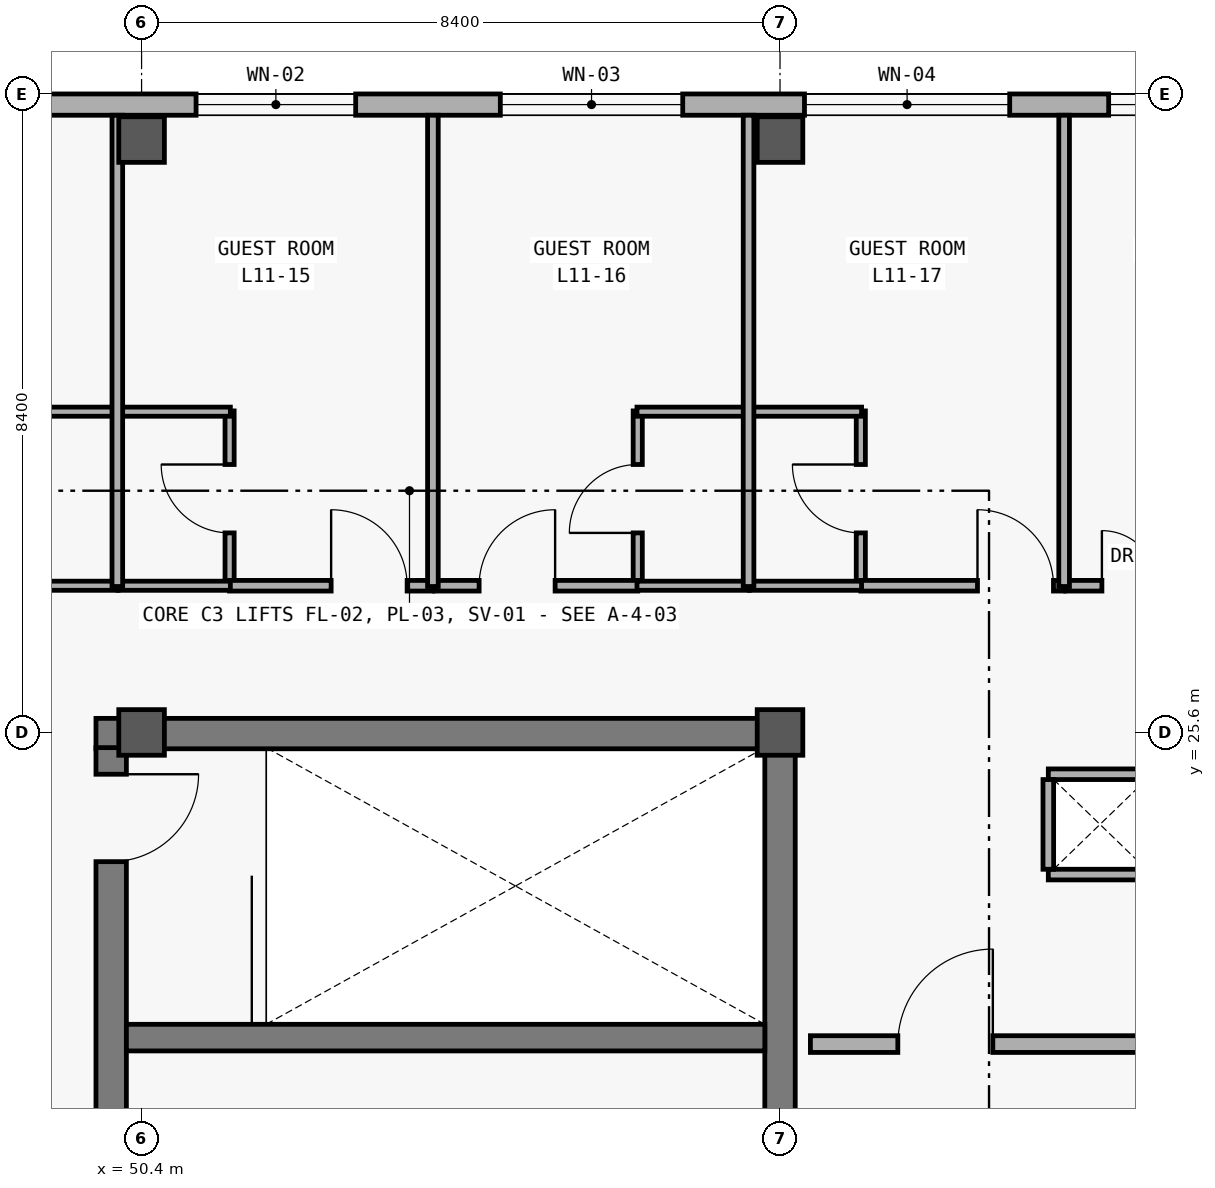
"""IFC4 building model, lengths in metres.
Left out: names, types, materials, properties, quantities, classifications, styles, units other than length and angle.
Written with IfcOpenShell. Run it as: python <this file> out.ifc"""

import sys

from ifc_helpers import new_model, si_unit, direction, frame, frame_2d, origin, origin_2d, place, context, subcontext, project, spatial, rectangle, extrude, element, fill, save


model = new_model("IFC4")
c1 = context("Model", 3, precision=1e-05, world=origin(), true_north=direction((0.0, 1.0)))
c2 = subcontext(c1, "Body", "Model", "MODEL_VIEW")
j1 = project(units=[si_unit("LENGTHUNIT", "METRE"), si_unit("PLANEANGLEUNIT", "RADIAN")], contexts=[c1])
p1 = place(None, origin())
s1 = spatial("IfcSite", under=j1, at=p1, CompositionType="ELEMENT")
p2 = place(p1, origin())
s2 = spatial("IfcBuilding", under=s1, at=p2, CompositionType="ELEMENT")
p3 = place(p2, frame((0.0, 0.0, 44.4)))
s3 = spatial("IfcBuildingStorey", under=s2, at=p3, CompositionType="ELEMENT", Elevation=44.4)
for number, where, z_axis, x_axis in (
    (1, (50.4, 25.6, 0.0), (0.0, 0.0, 1.0), (1.0, 0.0, 0.0)),
    (2, (50.4, 33.4, 0.0), (0.0, 0.0, 1.0), (1.0, 0.0, 0.0)),
    (3, (58.8, 25.6, 0.0), (0.0, 0.0, 1.0), (1.0, 0.0, 0.0)),
    (4, (58.8, 33.4, 0.0), (0.0, 0.0, 1.0), (1.0, 0.0, 0.0)),
):
    element("IfcColumn", number, at=place(p3, frame(where, z_axis=z_axis, x_axis=x_axis)), inside=s3, PredefinedType="COLUMN", context=c2, shape_type="SweptSolid", body=[
        extrude(rectangle(XDim=0.6, YDim=0.6, at=origin_2d()), origin(), (0.0, 0.0, 1.0), 4.2),
    ])
p4 = place(p3, frame((17.08, 33.86, 0.0), z_axis=(0.0, 0.0, 1.0), x_axis=(1.0, 0.0, 0.0)))
e5 = element("IfcWall", 5, at=p4, inside=s3, PredefinedType="SOLIDWALL", context=c2, shape_type="SweptSolid", body=[
    extrude(rectangle(XDim=49.84, YDim=0.28, at=frame_2d((24.92, 0.0))), origin(), (0.0, 0.0, 1.0), 3.96),
])
p5 = place(p4, frame((5.295, 0.0, 0.85)))
e6 = element("IfcOpeningElement", 6, at=p5, cuts=e5, PredefinedType="OPENING", context=c2, shape_type="SweptSolid", body=[
    extrude(rectangle(XDim=1.8, YDim=1.6, at=frame_2d((0.9, 0.8))), frame((0.0, 0.15, 0.0), z_axis=(0.0, -1.0, 0.0), x_axis=(1.0, 0.0, 0.0)), (0.0, 0.0, 1.0), 0.3),
])
p6 = place(p4, frame((13.136, 0.0, 0.85)))
e7 = element("IfcOpeningElement", 7, at=p6, cuts=e5, PredefinedType="OPENING", context=c2, shape_type="SweptSolid", body=[
    extrude(rectangle(XDim=2.38, YDim=1.95, at=frame_2d((1.19, 0.975))), frame((0.0, 0.15, 0.0), z_axis=(0.0, -1.0, 0.0), x_axis=(1.0, 0.0, 0.0)), (0.0, 0.0, 1.0), 0.3),
])
p7 = place(p4, frame((17.238, 0.0, 0.85)))
e8 = element("IfcOpeningElement", 8, at=p7, cuts=e5, PredefinedType="OPENING", context=c2, shape_type="SweptSolid", body=[
    extrude(rectangle(XDim=2.48, YDim=2.0, at=frame_2d((1.24, 1.0))), frame((0.0, 0.15, 0.0), z_axis=(0.0, -1.0, 0.0), x_axis=(1.0, 0.0, 0.0)), (0.0, 0.0, 1.0), 0.3),
])
p8 = place(p4, frame((21.305, 0.0, 0.85)))
e9 = element("IfcOpeningElement", 9, at=p8, cuts=e5, PredefinedType="OPENING", context=c2, shape_type="SweptSolid", body=[
    extrude(rectangle(XDim=2.65, YDim=2.0, at=frame_2d((1.325, 1.0))), frame((0.0, 0.15, 0.0), z_axis=(0.0, -1.0, 0.0), x_axis=(1.0, 0.0, 0.0)), (0.0, 0.0, 1.0), 0.3),
])
p9 = place(p4, frame((25.308, 0.0, 0.85)))
e10 = element("IfcOpeningElement", 10, at=p9, cuts=e5, PredefinedType="OPENING", context=c2, shape_type="SweptSolid", body=[
    extrude(rectangle(XDim=2.95, YDim=2.05, at=frame_2d((1.475, 1.025))), frame((0.0, 0.15, 0.0), z_axis=(0.0, -1.0, 0.0), x_axis=(1.0, 0.0, 0.0)), (0.0, 0.0, 1.0), 0.3),
])
p10 = place(p4, frame((30.035, 0.0, 0.85)))
e11 = element("IfcOpeningElement", 11, at=p10, cuts=e5, PredefinedType="OPENING", context=c2, shape_type="SweptSolid", body=[
    extrude(rectangle(XDim=1.8, YDim=1.8, at=frame_2d((0.9, 0.9))), frame((0.0, 0.15, 0.0), z_axis=(0.0, -1.0, 0.0), x_axis=(1.0, 0.0, 0.0)), (0.0, 0.0, 1.0), 0.3),
])
p11 = place(p4, frame((34.037, 0.0, 0.85)))
e12 = element("IfcOpeningElement", 12, at=p11, cuts=e5, PredefinedType="OPENING", context=c2, shape_type="SweptSolid", body=[
    extrude(rectangle(XDim=2.1, YDim=1.8, at=frame_2d((1.05, 0.9))), frame((0.0, 0.15, 0.0), z_axis=(0.0, -1.0, 0.0), x_axis=(1.0, 0.0, 0.0)), (0.0, 0.0, 1.0), 0.3),
])
p12 = place(p4, frame((38.04, 0.0, 0.85)))
e13 = element("IfcOpeningElement", 13, at=p12, cuts=e5, PredefinedType="OPENING", context=c2, shape_type="SweptSolid", body=[
    extrude(rectangle(XDim=2.4, YDim=1.8, at=frame_2d((1.2, 0.9))), frame((0.0, 0.15, 0.0), z_axis=(0.0, -1.0, 0.0), x_axis=(1.0, 0.0, 0.0)), (0.0, 0.0, 1.0), 0.3),
])
p13 = place(p4, frame((42.042, 0.0, 0.85)))
e14 = element("IfcOpeningElement", 14, at=p13, cuts=e5, PredefinedType="OPENING", context=c2, shape_type="SweptSolid", body=[
    extrude(rectangle(XDim=2.7, YDim=1.85, at=frame_2d((1.35, 0.925))), frame((0.0, 0.15, 0.0), z_axis=(0.0, -1.0, 0.0), x_axis=(1.0, 0.0, 0.0)), (0.0, 0.0, 1.0), 0.3),
])
p14 = place(p4, frame((46.044, 0.0, 0.85)))
e15 = element("IfcOpeningElement", 15, at=p14, cuts=e5, PredefinedType="OPENING", context=c2, shape_type="SweptSolid", body=[
    extrude(rectangle(XDim=3.0, YDim=1.9, at=frame_2d((1.5, 0.95))), frame((0.0, 0.15, 0.0), z_axis=(0.0, -1.0, 0.0), x_axis=(1.0, 0.0, 0.0)), (0.0, 0.0, 1.0), 0.3),
])
p15 = place(p3, frame((59.0, 25.585, 0.0), z_axis=(0.0, 0.0, 1.0), x_axis=(-1.0, 0.0, 0.0)))
e16 = element("IfcWall", 16, at=p15, inside=s3, PredefinedType="SHEAR", context=c2, shape_type="SweptSolid", body=[
    extrude(rectangle(XDim=9.2, YDim=0.4, at=frame_2d((4.6, 0.0))), origin(), (0.0, 0.0, 1.0), 3.96),
])
p16 = place(p3, frame((50.0, 25.4, 0.0), z_axis=(0.0, 0.0, 1.0), x_axis=(0.0, -1.0, 0.0)))
e17 = element("IfcWall", 17, at=p16, inside=s3, PredefinedType="SHEAR", context=c2, shape_type="SweptSolid", body=[
    extrude(rectangle(XDim=7.4, YDim=0.4, at=frame_2d((3.7, 0.0))), origin(), (0.0, 0.0, 1.0), 3.96),
])
p17 = place(p16, frame((0.35, 0.0, 0.0)))
e18 = element("IfcOpeningElement", 18, at=p17, cuts=e17, PredefinedType="OPENING", context=c2, shape_type="SweptSolid", body=[
    extrude(rectangle(XDim=1.15, YDim=2.2, at=frame_2d((0.575, 1.1))), frame((0.0, 0.21, 0.0), z_axis=(0.0, -1.0, 0.0), x_axis=(1.0, 0.0, 0.0)), (0.0, 0.0, 1.0), 0.42),
])
p18 = place(p3, frame((58.8, 18.0, 0.0), z_axis=(0.0, 0.0, 1.0), x_axis=(0.0, 1.0, 0.0)))
e19 = element("IfcWall", 19, at=p18, inside=s3, PredefinedType="SHEAR", context=c2, shape_type="SweptSolid", body=[
    extrude(rectangle(XDim=7.4, YDim=0.4, at=frame_2d((3.7, 0.0))), origin(), (0.0, 0.0, 1.0), 3.96),
])
p19 = place(p3, frame((50.2, 21.585, 0.0), z_axis=(0.0, 0.0, 1.0), x_axis=(1.0, 0.0, 0.0)))
e20 = element("IfcWall", 20, at=p19, inside=s3, PredefinedType="SHEAR", context=c2, shape_type="SweptSolid", body=[
    extrude(rectangle(XDim=8.4, YDim=0.35, at=frame_2d((4.2, 0.0))), origin(), (0.0, 0.0, 1.0), 3.96),
])
p20 = place(p3, frame((59.2, 21.5, 0.0), z_axis=(0.0, 0.0, 1.0), x_axis=(1.0, 0.0, 0.0)))
e21 = element("IfcWall", 21, at=p20, inside=s3, PredefinedType="SOLIDWALL", context=c2, shape_type="SweptSolid", body=[
    extrude(rectangle(XDim=4.8, YDim=0.22, at=frame_2d((2.4, 0.0))), origin(), (0.0, 0.0, 1.0), 3.11),
])
p21 = place(p20, frame((1.15, 0.0, 0.0)))
e22 = element("IfcOpeningElement", 22, at=p21, cuts=e21, PredefinedType="OPENING", context=c2, shape_type="SweptSolid", body=[
    extrude(rectangle(XDim=1.25, YDim=2.2, at=frame_2d((0.625, 1.1))), frame((0.0, 0.12, 0.0), z_axis=(0.0, -1.0, 0.0), x_axis=(1.0, 0.0, 0.0)), (0.0, 0.0, 1.0), 0.24),
])
p22 = place(p3, frame((51.558, 27.52, 0.0), z_axis=(0.0, 0.0, 1.0), x_axis=(0.0, 1.0, 0.0)))
e23 = element("IfcWall", 23, at=p22, inside=s3, PredefinedType="PARTITIONING", context=c2, shape_type="SweptSolid", body=[
    extrude(rectangle(XDim=2.31, YDim=0.12, at=frame_2d((1.155, 0.0))), origin(), (0.0, 0.0, 1.0), 3.06),
])
p23 = place(p22, frame((0.705, 0.0, 0.0)))
e24 = element("IfcOpeningElement", 24, at=p23, cuts=e23, PredefinedType="OPENING", context=c2, shape_type="SweptSolid", body=[
    extrude(rectangle(XDim=0.9, YDim=2.18, at=frame_2d((0.45, 1.09))), frame((0.0, 0.07, 0.0), z_axis=(0.0, -1.0, 0.0), x_axis=(1.0, 0.0, 0.0)), (0.0, 0.0, 1.0), 0.14),
])
p24 = place(p3, frame((56.928, 27.52, 0.0), z_axis=(0.0, 0.0, 1.0), x_axis=(0.0, 1.0, 0.0)))
e25 = element("IfcWall", 25, at=p24, inside=s3, PredefinedType="PARTITIONING", context=c2, shape_type="SweptSolid", body=[
    extrude(rectangle(XDim=2.31, YDim=0.12, at=frame_2d((1.155, 0.0))), origin(), (0.0, 0.0, 1.0), 3.06),
])
p25 = place(p24, frame((0.705, 0.0, 0.0)))
e26 = element("IfcOpeningElement", 26, at=p25, cuts=e25, PredefinedType="OPENING", context=c2, shape_type="SweptSolid", body=[
    extrude(rectangle(XDim=0.9, YDim=2.18, at=frame_2d((0.45, 1.09))), frame((0.0, 0.07, 0.0), z_axis=(0.0, -1.0, 0.0), x_axis=(1.0, 0.0, 0.0)), (0.0, 0.0, 1.0), 0.14),
])
p26 = place(p3, frame((59.863, 27.52, 0.0), z_axis=(0.0, 0.0, 1.0), x_axis=(0.0, 1.0, 0.0)))
e27 = element("IfcWall", 27, at=p26, inside=s3, PredefinedType="PARTITIONING", context=c2, shape_type="SweptSolid", body=[
    extrude(rectangle(XDim=2.31, YDim=0.12, at=frame_2d((1.155, 0.0))), origin(), (0.0, 0.0, 1.0), 3.06),
])
p27 = place(p26, frame((0.705, 0.0, 0.0)))
e28 = element("IfcOpeningElement", 28, at=p27, cuts=e27, PredefinedType="OPENING", context=c2, shape_type="SweptSolid", body=[
    extrude(rectangle(XDim=0.9, YDim=2.18, at=frame_2d((0.45, 1.09))), frame((0.0, 0.07, 0.0), z_axis=(0.0, -1.0, 0.0), x_axis=(1.0, 0.0, 0.0)), (0.0, 0.0, 1.0), 0.14),
])
p28 = place(p3, frame((51.558, 27.53, 0.0), z_axis=(0.0, 0.0, 1.0), x_axis=(1.0, 0.0, 0.0)))
e29 = element("IfcWall", 29, at=p28, inside=s3, PredefinedType="PARTITIONING", context=c2, shape_type="SweptSolid", body=[
    extrude(rectangle(XDim=2.675, YDim=0.14, at=frame_2d((1.337, 0.0))), origin(), (0.0, 0.0, 1.0), 3.06),
])
p29 = place(p28, frame((1.336, 0.0, 0.0)))
e30 = element("IfcOpeningElement", 30, at=p29, cuts=e29, PredefinedType="OPENING", context=c2, shape_type="SweptSolid", body=[
    extrude(rectangle(XDim=1.0, YDim=2.28, at=frame_2d((0.5, 1.14))), frame((0.0, 0.08, 0.0), z_axis=(0.0, -1.0, 0.0), x_axis=(1.0, 0.0, 0.0)), (0.0, 0.0, 1.0), 0.16),
])
p30 = place(p3, frame((54.253, 27.53, 0.0), z_axis=(0.0, 0.0, 1.0), x_axis=(1.0, 0.0, 0.0)))
e31 = element("IfcWall", 31, at=p30, inside=s3, PredefinedType="PARTITIONING", context=c2, shape_type="SweptSolid", body=[
    extrude(rectangle(XDim=2.675, YDim=0.14, at=frame_2d((1.337, 0.0))), origin(), (0.0, 0.0, 1.0), 3.06),
])
p31 = place(p30, frame((0.588, 0.0, 0.0)))
e32 = element("IfcOpeningElement", 32, at=p31, cuts=e31, PredefinedType="OPENING", context=c2, shape_type="SweptSolid", body=[
    extrude(rectangle(XDim=1.0, YDim=2.28, at=frame_2d((0.5, 1.14))), frame((0.0, 0.08, 0.0), z_axis=(0.0, -1.0, 0.0), x_axis=(1.0, 0.0, 0.0)), (0.0, 0.0, 1.0), 0.16),
])
p32 = place(p3, frame((59.863, 27.53, 0.0), z_axis=(0.0, 0.0, 1.0), x_axis=(1.0, 0.0, 0.0)))
e33 = element("IfcWall", 33, at=p32, inside=s3, PredefinedType="PARTITIONING", context=c2, shape_type="SweptSolid", body=[
    extrude(rectangle(XDim=2.675, YDim=0.14, at=frame_2d((1.337, 0.0))), origin(), (0.0, 0.0, 1.0), 3.06),
])
p33 = place(p32, frame((1.535, 0.0, 0.0)))
e34 = element("IfcOpeningElement", 34, at=p33, cuts=e33, PredefinedType="OPENING", context=c2, shape_type="SweptSolid", body=[
    extrude(rectangle(XDim=1.0, YDim=2.28, at=frame_2d((0.5, 1.14))), frame((0.0, 0.08, 0.0), z_axis=(0.0, -1.0, 0.0), x_axis=(1.0, 0.0, 0.0)), (0.0, 0.0, 1.0), 0.16),
])
p34 = place(p3, frame((62.558, 27.53, 0.0), z_axis=(0.0, 0.0, 1.0), x_axis=(1.0, 0.0, 0.0)))
e35 = element("IfcWall", 35, at=p34, inside=s3, PredefinedType="PARTITIONING", context=c2, shape_type="SweptSolid", body=[
    extrude(rectangle(XDim=2.675, YDim=0.14, at=frame_2d((1.337, 0.0))), origin(), (0.0, 0.0, 1.0), 3.06),
])
p35 = place(p34, frame((0.477, 0.0, 0.0)))
e36 = element("IfcOpeningElement", 36, at=p35, cuts=e35, PredefinedType="OPENING", context=c2, shape_type="SweptSolid", body=[
    extrude(rectangle(XDim=1.45, YDim=2.3, at=frame_2d((0.725, 1.15))), frame((0.0, 0.08, 0.0), z_axis=(0.0, -1.0, 0.0), x_axis=(1.0, 0.0, 0.0)), (0.0, 0.0, 1.0), 0.16),
])
p36 = place(p3, frame((48.624, 27.53, 0.0), z_axis=(0.0, 0.0, 1.0), x_axis=(1.0, 0.0, 0.0)))
e37 = element("IfcWall", 37, at=p36, inside=s3, PredefinedType="PARTITIONING", context=c2, shape_type="SweptSolid", body=[
    extrude(rectangle(XDim=1.467, YDim=0.12, at=frame_2d((0.733, 0.0))), origin(), (0.0, 0.0, 1.0), 3.06),
])
for number, where, z_axis, x_axis in (
    (38, (48.614, 29.82, 0.0), (0.0, 0.0, 1.0), (1.0, 0.0, 0.0)),
    (39, (50.091, 27.53, 0.0), (0.0, 0.0, 1.0), (1.0, 0.0, 0.0)),
    (40, (50.091, 29.82, 0.0), (0.0, 0.0, 1.0), (1.0, 0.0, 0.0)),
):
    element("IfcWall", number, at=place(p3, frame(where, z_axis=z_axis, x_axis=x_axis)), inside=s3, PredefinedType="PARTITIONING", context=c2, shape_type="SweptSolid", body=[
        extrude(rectangle(XDim=1.477, YDim=0.12, at=frame_2d((0.739, 0.0))), origin(), (0.0, 0.0, 1.0), 3.06),
    ])
for number, where, z_axis, x_axis in (
    (41, (56.918, 27.53, 0.0), (0.0, 0.0, 1.0), (1.0, 0.0, 0.0)),
    (42, (56.918, 29.82, 0.0), (0.0, 0.0, 1.0), (1.0, 0.0, 0.0)),
):
    element("IfcWall", number, at=place(p3, frame(where, z_axis=z_axis, x_axis=x_axis)), inside=s3, PredefinedType="PARTITIONING", context=c2, shape_type="SweptSolid", body=[
        extrude(rectangle(XDim=1.478, YDim=0.12, at=frame_2d((0.739, 0.0))), origin(), (0.0, 0.0, 1.0), 3.06),
    ])
for number, where, z_axis, x_axis in (
    (43, (58.396, 27.53, 0.0), (0.0, 0.0, 1.0), (1.0, 0.0, 0.0)),
    (44, (58.396, 29.82, 0.0), (0.0, 0.0, 1.0), (1.0, 0.0, 0.0)),
):
    element("IfcWall", number, at=place(p3, frame(where, z_axis=z_axis, x_axis=x_axis)), inside=s3, PredefinedType="PARTITIONING", context=c2, shape_type="SweptSolid", body=[
        extrude(rectangle(XDim=1.477, YDim=0.12, at=frame_2d((0.739, 0.0))), origin(), (0.0, 0.0, 1.0), 3.06),
    ])
for number, where, z_axis, x_axis in (
    (45, (50.081, 27.52, 0.0), (0.0, 0.0, 1.0), (0.0, 1.0, 0.0)),
    (46, (54.233, 27.52, 0.0), (0.0, 0.0, 1.0), (0.0, 1.0, 0.0)),
    (47, (58.386, 27.52, 0.0), (0.0, 0.0, 1.0), (0.0, 1.0, 0.0)),
    (48, (62.538, 27.52, 0.0), (0.0, 0.0, 1.0), (0.0, 1.0, 0.0)),
):
    element("IfcWall", number, at=place(p3, frame(where, z_axis=z_axis, x_axis=x_axis)), inside=s3, PredefinedType="PARTITIONING", context=c2, shape_type="SweptSolid", body=[
        extrude(rectangle(XDim=6.2, YDim=0.14, at=frame_2d((3.1, 0.0))), origin(), (0.0, 0.0, 1.0), 3.06),
    ])
for number, where, z_axis, x_axis in (
    (49, (62.33, 23.73, 0.0), (0.0, 0.0, 1.0), (1.0, 0.0, 0.0)),
    (50, (63.69, 25.05, 0.0), (0.0, 0.0, 1.0), (-1.0, 0.0, 0.0)),
):
    element("IfcWall", number, at=place(p3, frame(where, z_axis=z_axis, x_axis=x_axis)), inside=s3, PredefinedType="PARTITIONING", context=c2, shape_type="SweptSolid", body=[
        extrude(rectangle(XDim=1.36, YDim=0.14, at=frame_2d((0.68, 0.0))), origin(), (0.0, 0.0, 1.0), 3.08),
    ])
p37 = place(p3, frame((62.33, 24.98, 0.0), z_axis=(0.0, 0.0, 1.0), x_axis=(0.0, -1.0, 0.0)))
e51 = element("IfcWall", 51, at=p37, inside=s3, PredefinedType="PARTITIONING", context=c2, shape_type="SweptSolid", body=[
    extrude(rectangle(XDim=1.18, YDim=0.14, at=frame_2d((0.59, 0.0))), origin(), (0.0, 0.0, 1.0), 3.08),
])
p38 = place(p11, origin())
e52 = element("IfcWindow", 52, at=p38, inside=s3, PartitioningType="SINGLE_PANEL", PredefinedType="WINDOW", context=c2, shape_type="SweptSolid", body=[
    extrude(rectangle(XDim=2.1, YDim=1.8, at=frame_2d((1.05, 0.9))), frame((0.0, 0.03, 0.0), z_axis=(0.0, -1.0, 0.0), x_axis=(1.0, 0.0, 0.0)), (0.0, 0.0, 1.0), 0.06),
])
fill(e12, e52)
p39 = place(p12, origin())
e53 = element("IfcWindow", 53, at=p39, inside=s3, PartitioningType="SINGLE_PANEL", PredefinedType="WINDOW", context=c2, shape_type="SweptSolid", body=[
    extrude(rectangle(XDim=2.4, YDim=1.8, at=frame_2d((1.2, 0.9))), frame((0.0, 0.03, 0.0), z_axis=(0.0, -1.0, 0.0), x_axis=(1.0, 0.0, 0.0)), (0.0, 0.0, 1.0), 0.06),
])
fill(e13, e53)
p40 = place(p13, origin())
e54 = element("IfcWindow", 54, at=p40, inside=s3, PartitioningType="SINGLE_PANEL", PredefinedType="WINDOW", context=c2, shape_type="SweptSolid", body=[
    extrude(rectangle(XDim=2.7, YDim=1.85, at=frame_2d((1.35, 0.925))), frame((0.0, 0.03, 0.0), z_axis=(0.0, -1.0, 0.0), x_axis=(1.0, 0.0, 0.0)), (0.0, 0.0, 1.0), 0.06),
])
fill(e14, e54)
p41 = place(p14, origin())
e55 = element("IfcWindow", 55, at=p41, inside=s3, PartitioningType="SINGLE_PANEL", PredefinedType="WINDOW", context=c2, shape_type="SweptSolid", body=[
    extrude(rectangle(XDim=3.0, YDim=1.9, at=frame_2d((1.5, 0.95))), frame((0.0, 0.03, 0.0), z_axis=(0.0, -1.0, 0.0), x_axis=(1.0, 0.0, 0.0)), (0.0, 0.0, 1.0), 0.06),
])
fill(e15, e55)
p42 = place(p17, origin())
e56 = element("IfcDoor", 56, at=p42, inside=s3, OperationType="SINGLE_SWING_LEFT", PredefinedType="DOOR", context=c2, shape_type="SweptSolid", body=[
    extrude(rectangle(XDim=1.15, YDim=2.2, at=frame_2d((0.575, 1.1))), frame((0.0, 0.025, 0.0), z_axis=(0.0, -1.0, 0.0), x_axis=(1.0, 0.0, 0.0)), (0.0, 0.0, 1.0), 0.05),
])
fill(e18, e56)
p43 = place(p21, origin())
e57 = element("IfcDoor", 57, at=p43, inside=s3, OperationType="SINGLE_SWING_RIGHT", PredefinedType="DOOR", context=c2, shape_type="SweptSolid", body=[
    extrude(rectangle(XDim=1.25, YDim=2.2, at=frame_2d((0.625, 1.1))), frame((0.0, 0.025, 0.0), z_axis=(0.0, -1.0, 0.0), x_axis=(1.0, 0.0, 0.0)), (0.0, 0.0, 1.0), 0.05),
])
fill(e22, e57)
p44 = place(p23, origin())
e58 = element("IfcDoor", 58, at=p44, inside=s3, OperationType="SINGLE_SWING_RIGHT", PredefinedType="DOOR", context=c2, shape_type="SweptSolid", body=[
    extrude(rectangle(XDim=0.9, YDim=2.18, at=frame_2d((0.45, 1.09))), frame((0.0, 0.025, 0.0), z_axis=(0.0, -1.0, 0.0), x_axis=(1.0, 0.0, 0.0)), (0.0, 0.0, 1.0), 0.05),
])
fill(e24, e58)
p45 = place(p25, origin())
e59 = element("IfcDoor", 59, at=p45, inside=s3, OperationType="SINGLE_SWING_LEFT", PredefinedType="DOOR", context=c2, shape_type="SweptSolid", body=[
    extrude(rectangle(XDim=0.9, YDim=2.18, at=frame_2d((0.45, 1.09))), frame((0.0, 0.025, 0.0), z_axis=(0.0, -1.0, 0.0), x_axis=(1.0, 0.0, 0.0)), (0.0, 0.0, 1.0), 0.05),
])
fill(e26, e59)
p46 = place(p27, origin())
e60 = element("IfcDoor", 60, at=p46, inside=s3, OperationType="SINGLE_SWING_RIGHT", PredefinedType="DOOR", context=c2, shape_type="SweptSolid", body=[
    extrude(rectangle(XDim=0.9, YDim=2.18, at=frame_2d((0.45, 1.09))), frame((0.0, 0.025, 0.0), z_axis=(0.0, -1.0, 0.0), x_axis=(1.0, 0.0, 0.0)), (0.0, 0.0, 1.0), 0.05),
])
fill(e28, e60)
p47 = place(p29, origin())
e61 = element("IfcDoor", 61, at=p47, inside=s3, OperationType="SINGLE_SWING_LEFT", PredefinedType="DOOR", context=c2, shape_type="SweptSolid", body=[
    extrude(rectangle(XDim=1.0, YDim=2.28, at=frame_2d((0.5, 1.14))), frame((0.0, 0.025, 0.0), z_axis=(0.0, -1.0, 0.0), x_axis=(1.0, 0.0, 0.0)), (0.0, 0.0, 1.0), 0.05),
])
fill(e30, e61)
p48 = place(p31, origin())
e62 = element("IfcDoor", 62, at=p48, inside=s3, OperationType="SINGLE_SWING_RIGHT", PredefinedType="DOOR", context=c2, shape_type="SweptSolid", body=[
    extrude(rectangle(XDim=1.0, YDim=2.28, at=frame_2d((0.5, 1.14))), frame((0.0, 0.025, 0.0), z_axis=(0.0, -1.0, 0.0), x_axis=(1.0, 0.0, 0.0)), (0.0, 0.0, 1.0), 0.05),
])
fill(e32, e62)
p49 = place(p33, origin())
e63 = element("IfcDoor", 63, at=p49, inside=s3, OperationType="SINGLE_SWING_LEFT", PredefinedType="DOOR", context=c2, shape_type="SweptSolid", body=[
    extrude(rectangle(XDim=1.0, YDim=2.28, at=frame_2d((0.5, 1.14))), frame((0.0, 0.025, 0.0), z_axis=(0.0, -1.0, 0.0), x_axis=(1.0, 0.0, 0.0)), (0.0, 0.0, 1.0), 0.05),
])
fill(e34, e63)
p50 = place(p35, origin())
e64 = element("IfcDoor", 64, at=p50, inside=s3, OperationType="DOUBLE_DOOR_SINGLE_SWING", PredefinedType="DOOR", context=c2, shape_type="SweptSolid", body=[
    extrude(rectangle(XDim=1.45, YDim=2.3, at=frame_2d((0.725, 1.15))), frame((0.0, 0.025, 0.0), z_axis=(0.0, -1.0, 0.0), x_axis=(1.0, 0.0, 0.0)), (0.0, 0.0, 1.0), 0.05),
])
fill(e36, e64)
save(model, sys.argv[1])
